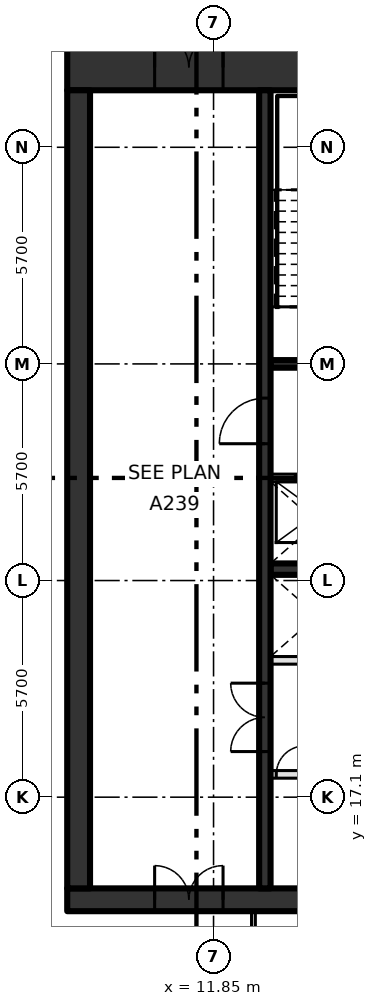
"""IFC4 building model, lengths in metres.
Left out: names, types, materials, properties, quantities, classifications, styles, units other than length and angle.
Written with IfcOpenShell. Run it as: python <this file> out.ifc"""

import sys

from ifc_helpers import new_model, si_unit, direction, frame, frame_2d, origin, place, context, subcontext, project, spatial, rectangle, extrude, element, fill, save


model = new_model("IFC4")
c1 = context("Model", 3, precision=1e-05, world=origin(), true_north=direction((0.0, 1.0)))
c2 = subcontext(c1, "Body", "Model", "MODEL_VIEW")
j1 = project(units=[si_unit("LENGTHUNIT", "METRE"), si_unit("PLANEANGLEUNIT", "RADIAN")], contexts=[c1])
p1 = place(None, origin())
s1 = spatial("IfcSite", under=j1, at=p1, CompositionType="ELEMENT")
p2 = place(p1, origin())
s2 = spatial("IfcBuilding", under=s1, at=p2, CompositionType="ELEMENT")
p3 = place(p2, frame((0.0, 0.0, 289.8)))
s3 = spatial("IfcBuildingStorey", under=s2, at=p3, CompositionType="ELEMENT", Elevation=289.8)
p4 = place(p3, frame((8.0, 14.4, -0.3), z_axis=(0.0, 0.0, 1.0), x_axis=(1.0, 0.0, 0.0)))
e1 = element("IfcWall", 1, at=p4, inside=s3, PredefinedType="SHEAR", context=c2, shape_type="SweptSolid", body=[
    extrude(rectangle(XDim=22.8, YDim=0.6, at=frame_2d((11.4, 0.0))), origin(), (0.0, 0.0, 1.0), 4.2),
])
p5 = place(p4, frame((2.3, 0.0, 0.3)))
e2 = element("IfcOpeningElement", 2, at=p5, cuts=e1, PredefinedType="OPENING", context=c2, shape_type="SweptSolid", body=[
    extrude(rectangle(XDim=1.8, YDim=2.1, at=frame_2d((0.9, 1.05))), frame((0.0, 0.31, 0.0), z_axis=(0.0, -1.0, 0.0), x_axis=(1.0, 0.0, 0.0)), (0.0, 0.0, 1.0), 0.62),
])
p6 = place(p3, frame((8.0, 36.3, -0.3), z_axis=(0.0, 0.0, 1.0), x_axis=(1.0, 0.0, 0.0)))
e3 = element("IfcWall", 3, at=p6, inside=s3, PredefinedType="SHEAR", context=c2, shape_type="SweptSolid", body=[
    extrude(rectangle(XDim=22.8, YDim=1.2, at=frame_2d((11.4, 0.0))), origin(), (0.0, 0.0, 1.0), 4.2),
])
p7 = place(p6, frame((2.3, 0.0, 0.3)))
e4 = element("IfcOpeningElement", 4, at=p7, cuts=e3, PredefinedType="OPENING", context=c2, shape_type="SweptSolid", body=[
    extrude(rectangle(XDim=1.8, YDim=2.1, at=frame_2d((0.9, 1.05))), frame((0.0, 0.61, 0.0), z_axis=(0.0, -1.0, 0.0), x_axis=(1.0, 0.0, 0.0)), (0.0, 0.0, 1.0), 1.22),
])
p8 = place(p3, frame((8.3, 14.7, -0.3), z_axis=(0.0, 0.0, 1.0), x_axis=(0.0, 1.0, 0.0)))
e5 = element("IfcWall", 5, at=p8, inside=s3, PredefinedType="SHEAR", context=c2, shape_type="SweptSolid", body=[
    extrude(rectangle(XDim=21.0, YDim=0.6, at=frame_2d((10.5, 0.0))), origin(), (0.0, 0.0, 1.0), 4.2),
])
p9 = place(p3, frame((13.35, 17.7, 0.0), z_axis=(0.0, 0.0, 1.0), x_axis=(1.0, 0.0, 0.0)))
e6 = element("IfcWall", 6, at=p9, inside=s3, PredefinedType="SOLIDWALL", context=c2, shape_type="SweptSolid", body=[
    extrude(rectangle(XDim=13.425, YDim=0.2, at=frame_2d((6.712, 0.0))), origin(), (0.0, 0.0, 1.0), 3.9),
])
p10 = place(p9, frame((2.0, 0.0, 0.0)))
e7 = element("IfcOpeningElement", 7, at=p10, cuts=e6, PredefinedType="OPENING", context=c2, shape_type="SweptSolid", body=[
    extrude(rectangle(XDim=1.1, YDim=2.1, at=frame_2d((0.55, 1.05))), frame((0.0, 0.11, 0.0), z_axis=(0.0, -1.0, 0.0), x_axis=(1.0, 0.0, 0.0)), (0.0, 0.0, 1.0), 0.22),
])
p11 = place(p9, frame((4.7, 0.0, 0.0)))
e8 = element("IfcOpeningElement", 8, at=p11, cuts=e6, PredefinedType="OPENING", context=c2, shape_type="SweptSolid", body=[
    extrude(rectangle(XDim=1.1, YDim=2.1, at=frame_2d((0.55, 1.05))), frame((0.0, 0.11, 0.0), z_axis=(0.0, -1.0, 0.0), x_axis=(1.0, 0.0, 0.0)), (0.0, 0.0, 1.0), 0.22),
])
p12 = place(p9, frame((7.4, 0.0, 0.0)))
e9 = element("IfcOpeningElement", 9, at=p12, cuts=e6, PredefinedType="OPENING", context=c2, shape_type="SweptSolid", body=[
    extrude(rectangle(XDim=1.1, YDim=2.1, at=frame_2d((0.55, 1.05))), frame((0.0, 0.11, 0.0), z_axis=(0.0, -1.0, 0.0), x_axis=(1.0, 0.0, 0.0)), (0.0, 0.0, 1.0), 0.22),
])
p13 = place(p9, frame((10.1, 0.0, 0.0)))
e10 = element("IfcOpeningElement", 10, at=p13, cuts=e6, PredefinedType="OPENING", context=c2, shape_type="SweptSolid", body=[
    extrude(rectangle(XDim=1.1, YDim=2.1, at=frame_2d((0.55, 1.05))), frame((0.0, 0.11, 0.0), z_axis=(0.0, -1.0, 0.0), x_axis=(1.0, 0.0, 0.0)), (0.0, 0.0, 1.0), 0.22),
])
p14 = place(p9, frame((0.15, 0.0, 0.0)))
e11 = element("IfcOpeningElement", 11, at=p14, cuts=e6, PredefinedType="OPENING", context=c2, shape_type="SweptSolid", body=[
    extrude(rectangle(XDim=0.75, YDim=2.1, at=frame_2d((0.375, 1.05))), frame((0.0, 0.11, 0.0), z_axis=(0.0, -1.0, 0.0), x_axis=(1.0, 0.0, 0.0)), (0.0, 0.0, 1.0), 0.22),
])
p15 = place(p9, frame((12.3, 0.0, 0.0)))
e12 = element("IfcOpeningElement", 12, at=p15, cuts=e6, PredefinedType="OPENING", context=c2, shape_type="SweptSolid", body=[
    extrude(rectangle(XDim=0.75, YDim=2.1, at=frame_2d((0.375, 1.05))), frame((0.0, 0.11, 0.0), z_axis=(0.0, -1.0, 0.0), x_axis=(1.0, 0.0, 0.0)), (0.0, 0.0, 1.0), 0.22),
])
p16 = place(p3, frame((13.35, 20.7, 0.0), z_axis=(0.0, 0.0, 1.0), x_axis=(1.0, 0.0, 0.0)))
e13 = element("IfcWall", 13, at=p16, inside=s3, PredefinedType="SOLIDWALL", context=c2, shape_type="SweptSolid", body=[
    extrude(rectangle(XDim=13.45, YDim=0.2, at=frame_2d((6.725, 0.0))), origin(), (0.0, 0.0, 1.0), 3.9),
])
p17 = place(p3, frame((13.35, 23.1, 0.0), z_axis=(0.0, 0.0, 1.0), x_axis=(1.0, 0.0, 0.0)))
e14 = element("IfcWall", 14, at=p17, inside=s3, PredefinedType="SHEAR", context=c2, shape_type="SweptSolid", body=[
    extrude(rectangle(XDim=16.85, YDim=0.3, at=frame_2d((8.425, 0.0))), origin(), (0.0, 0.0, 1.0), 3.9),
])
p18 = place(p3, frame((13.35, 25.5, 0.0), z_axis=(0.0, 0.0, 1.0), x_axis=(1.0, 0.0, 0.0)))
e15 = element("IfcWall", 15, at=p18, inside=s3, PredefinedType="SOLIDWALL", context=c2, shape_type="SweptSolid", body=[
    extrude(rectangle(XDim=16.85, YDim=0.2, at=frame_2d((8.425, 0.0))), origin(), (0.0, 0.0, 1.0), 3.9),
])
p19 = place(p18, frame((0.65, 0.0, 0.0)))
e16 = element("IfcOpeningElement", 16, at=p19, cuts=e15, PredefinedType="OPENING", context=c2, shape_type="SweptSolid", body=[
    extrude(rectangle(XDim=1.1, YDim=2.1, at=frame_2d((0.55, 1.05))), frame((0.0, 0.11, 0.0), z_axis=(0.0, -1.0, 0.0), x_axis=(1.0, 0.0, 0.0)), (0.0, 0.0, 1.0), 0.22),
])
p20 = place(p18, frame((3.35, 0.0, 0.0)))
e17 = element("IfcOpeningElement", 17, at=p20, cuts=e15, PredefinedType="OPENING", context=c2, shape_type="SweptSolid", body=[
    extrude(rectangle(XDim=1.1, YDim=2.1, at=frame_2d((0.55, 1.05))), frame((0.0, 0.11, 0.0), z_axis=(0.0, -1.0, 0.0), x_axis=(1.0, 0.0, 0.0)), (0.0, 0.0, 1.0), 0.22),
])
p21 = place(p18, frame((6.05, 0.0, 0.0)))
e18 = element("IfcOpeningElement", 18, at=p21, cuts=e15, PredefinedType="OPENING", context=c2, shape_type="SweptSolid", body=[
    extrude(rectangle(XDim=1.1, YDim=2.1, at=frame_2d((0.55, 1.05))), frame((0.0, 0.11, 0.0), z_axis=(0.0, -1.0, 0.0), x_axis=(1.0, 0.0, 0.0)), (0.0, 0.0, 1.0), 0.22),
])
p22 = place(p18, frame((8.75, 0.0, 0.0)))
e19 = element("IfcOpeningElement", 19, at=p22, cuts=e15, PredefinedType="OPENING", context=c2, shape_type="SweptSolid", body=[
    extrude(rectangle(XDim=1.1, YDim=2.1, at=frame_2d((0.55, 1.05))), frame((0.0, 0.11, 0.0), z_axis=(0.0, -1.0, 0.0), x_axis=(1.0, 0.0, 0.0)), (0.0, 0.0, 1.0), 0.22),
])
p23 = place(p3, frame((13.35, 28.5, 0.0), z_axis=(0.0, 0.0, 1.0), x_axis=(1.0, 0.0, 0.0)))
e20 = element("IfcWall", 20, at=p23, inside=s3, PredefinedType="SOLIDWALL", context=c2, shape_type="SweptSolid", body=[
    extrude(rectangle(XDim=6.75, YDim=0.2, at=frame_2d((3.375, 0.0))), origin(), (0.0, 0.0, 1.0), 3.9),
])
p24 = place(p23, frame((0.95, 0.0, 0.0)))
e21 = element("IfcOpeningElement", 21, at=p24, cuts=e20, PredefinedType="OPENING", context=c2, shape_type="SweptSolid", body=[
    extrude(rectangle(XDim=1.2, YDim=2.1, at=frame_2d((0.6, 1.05))), frame((0.0, 0.11, 0.0), z_axis=(0.0, -1.0, 0.0), x_axis=(1.0, 0.0, 0.0)), (0.0, 0.0, 1.0), 0.22),
])
p25 = place(p23, frame((3.75, 0.0, 0.0)))
e22 = element("IfcOpeningElement", 22, at=p25, cuts=e20, PredefinedType="OPENING", context=c2, shape_type="SweptSolid", body=[
    extrude(rectangle(XDim=1.1, YDim=2.1, at=frame_2d((0.55, 1.05))), frame((0.0, 0.11, 0.0), z_axis=(0.0, -1.0, 0.0), x_axis=(1.0, 0.0, 0.0)), (0.0, 0.0, 1.0), 0.22),
])
p26 = place(p3, frame((13.2, 14.7, 0.0), z_axis=(0.0, 0.0, 1.0), x_axis=(0.0, 1.0, 0.0)))
e23 = element("IfcWall", 23, at=p26, inside=s3, PredefinedType="SHEAR", context=c2, shape_type="SweptSolid", body=[
    extrude(rectangle(XDim=21.0, YDim=0.3, at=frame_2d((10.5, 0.0))), origin(), (0.0, 0.0, 1.0), 3.9),
])
p27 = place(p26, frame((3.6, 0.0, 0.0)))
e24 = element("IfcOpeningElement", 24, at=p27, cuts=e23, PredefinedType="OPENING", context=c2, shape_type="SweptSolid", body=[
    extrude(rectangle(XDim=1.8, YDim=2.1, at=frame_2d((0.9, 1.05))), frame((0.0, 0.16, 0.0), z_axis=(0.0, -1.0, 0.0), x_axis=(1.0, 0.0, 0.0)), (0.0, 0.0, 1.0), 0.32),
])
p28 = place(p26, frame((11.7, 0.0, 0.0)))
e25 = element("IfcOpeningElement", 25, at=p28, cuts=e23, PredefinedType="OPENING", context=c2, shape_type="SweptSolid", body=[
    extrude(rectangle(XDim=1.2, YDim=2.1, at=frame_2d((0.6, 1.05))), frame((0.0, 0.16, 0.0), z_axis=(0.0, -1.0, 0.0), x_axis=(1.0, 0.0, 0.0)), (0.0, 0.0, 1.0), 0.32),
])
p29 = place(p3, frame((12.9, 10.078, 0.0), z_axis=(0.0, 0.0, 1.0), x_axis=(0.0, 1.0, 0.0)))
e26 = element("IfcWall", 26, at=p29, inside=s3, PredefinedType="PARTITIONING", context=c2, shape_type="SweptSolid", body=[
    extrude(rectangle(XDim=4.022, YDim=0.1, at=frame_2d((2.011, 0.0))), origin(), (0.0, 0.0, 1.0), 3.9),
])
p30 = place(p29, frame((1.68, 0.0, 0.0)))
e27 = element("IfcOpeningElement", 27, at=p30, cuts=e26, PredefinedType="OPENING", context=c2, shape_type="SweptSolid", body=[
    extrude(rectangle(XDim=1.0, YDim=2.1, at=frame_2d((0.5, 1.05))), frame((0.0, 0.06, 0.0), z_axis=(0.0, -1.0, 0.0), x_axis=(1.0, 0.0, 0.0)), (0.0, 0.0, 1.0), 0.12),
])
p31 = place(p19, origin())
e28 = element("IfcDoor", 28, at=p31, inside=s3, OperationType="SLIDING_TO_LEFT", PredefinedType="DOOR", context=c2, shape_type="SweptSolid", body=[
    extrude(rectangle(XDim=1.1, YDim=2.1, at=frame_2d((0.55, 1.05))), frame((0.0, 0.025, 0.0), z_axis=(0.0, -1.0, 0.0), x_axis=(1.0, 0.0, 0.0)), (0.0, 0.0, 1.0), 0.05),
])
fill(e16, e28)
p32 = place(p14, origin())
e29 = element("IfcDoor", 29, at=p32, inside=s3, OperationType="SINGLE_SWING_RIGHT", PredefinedType="DOOR", context=c2, shape_type="SweptSolid", body=[
    extrude(rectangle(XDim=0.75, YDim=2.1, at=frame_2d((0.375, 1.05))), frame((0.0, 0.025, 0.0), z_axis=(0.0, -1.0, 0.0), x_axis=(1.0, 0.0, 0.0)), (0.0, 0.0, 1.0), 0.05),
])
fill(e11, e29)
p33 = place(p27, origin())
e30 = element("IfcDoor", 30, at=p33, inside=s3, OperationType="DOUBLE_DOOR_SINGLE_SWING", PredefinedType="DOOR", context=c2, shape_type="SweptSolid", body=[
    extrude(rectangle(XDim=1.8, YDim=2.1, at=frame_2d((0.9, 1.05))), frame((0.0, 0.025, 0.0), z_axis=(0.0, -1.0, 0.0), x_axis=(1.0, 0.0, 0.0)), (0.0, 0.0, 1.0), 0.05),
])
fill(e24, e30)
p34 = place(p28, origin())
e31 = element("IfcDoor", 31, at=p34, inside=s3, OperationType="SINGLE_SWING_LEFT", PredefinedType="DOOR", context=c2, shape_type="SweptSolid", body=[
    extrude(rectangle(XDim=1.2, YDim=2.1, at=frame_2d((0.6, 1.05))), frame((0.0, 0.025, 0.0), z_axis=(0.0, -1.0, 0.0), x_axis=(1.0, 0.0, 0.0)), (0.0, 0.0, 1.0), 0.05),
])
fill(e25, e31)
p35 = place(p7, origin())
e32 = element("IfcDoor", 32, at=p35, inside=s3, OperationType="DOUBLE_DOOR_SINGLE_SWING", PredefinedType="DOOR", context=c2, shape_type="SweptSolid", body=[
    extrude(rectangle(XDim=1.8, YDim=2.1, at=frame_2d((0.9, 1.05))), frame((0.0, 0.025, 0.0), z_axis=(0.0, -1.0, 0.0), x_axis=(1.0, 0.0, 0.0)), (0.0, 0.0, 1.0), 0.05),
])
fill(e4, e32)
p36 = place(p5, origin())
e33 = element("IfcDoor", 33, at=p36, inside=s3, OperationType="DOUBLE_DOOR_SINGLE_SWING", PredefinedType="DOOR", context=c2, shape_type="SweptSolid", body=[
    extrude(rectangle(XDim=1.8, YDim=2.1, at=frame_2d((0.9, 1.05))), frame((0.0, 0.025, 0.0), z_axis=(0.0, -1.0, 0.0), x_axis=(1.0, 0.0, 0.0)), (0.0, 0.0, 1.0), 0.05),
])
fill(e2, e33)
save(model, sys.argv[1])
